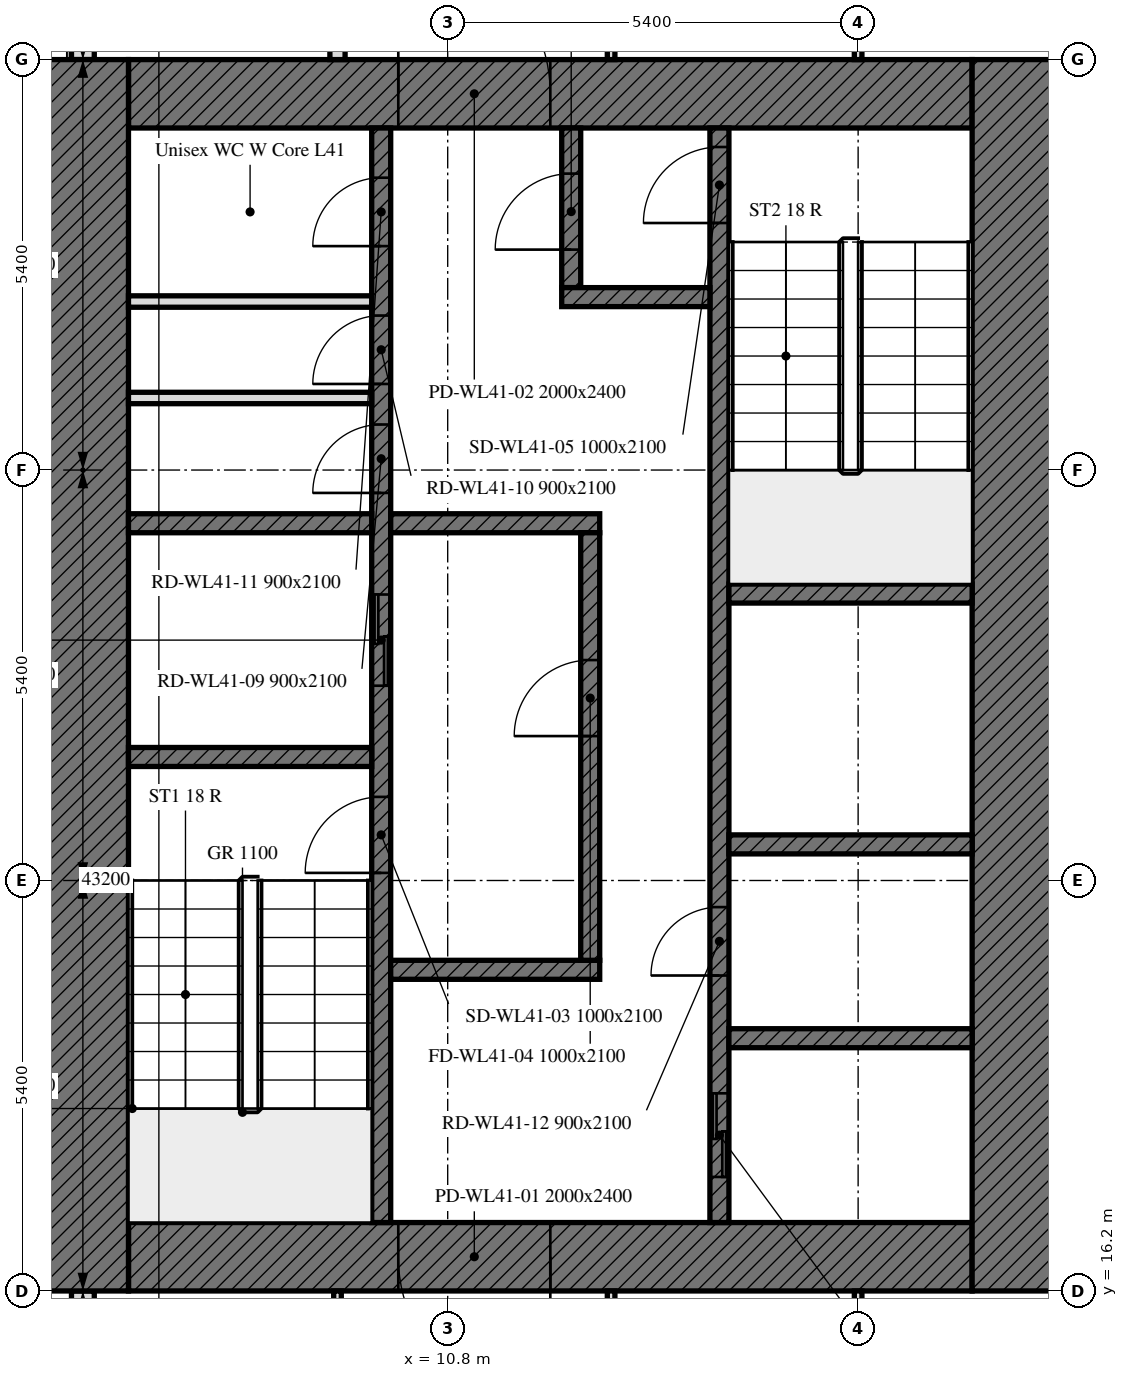
"""IFC4 building model, lengths in metres.
Left out: names, types, materials, properties, quantities, classifications, styles, units other than length and angle.
Written with IfcOpenShell. Run it as: python <this file> out.ifc"""

import sys

from ifc_helpers import new_model, si_unit, direction, frame, frame_2d, origin, place, context, subcontext, project, spatial, rectangle, extrude, element, fill, save


model = new_model("IFC4")
c1 = context("Model", 3, precision=1e-05, world=origin(), true_north=direction((0.0, 1.0)))
c2 = subcontext(c1, "Body", "Model", "MODEL_VIEW")
j1 = project(units=[si_unit("LENGTHUNIT", "METRE"), si_unit("PLANEANGLEUNIT", "RADIAN")], contexts=[c1])
p1 = place(None, origin())
s1 = spatial("IfcSite", under=j1, at=p1, CompositionType="ELEMENT")
p2 = place(p1, origin())
s2 = spatial("IfcBuilding", under=s1, at=p2, CompositionType="ELEMENT")
p3 = place(p2, frame((0.0, 0.0, 172.6)))
s3 = spatial("IfcBuildingStorey", under=s2, at=p3, CompositionType="ELEMENT", Elevation=172.6)
p4 = place(p3, frame((6.0, 37.614, 0.0), z_axis=(0.0, 0.0, 1.0), x_axis=(0.0, -1.0, 0.0)))
e1 = element("IfcWall", 1, at=p4, inside=s3, PredefinedType="SOLIDWALL", context=c2, shape_type="SweptSolid", body=[
    extrude(rectangle(XDim=5.214, YDim=0.3, at=frame_2d((2.607, 0.0))), origin(), (0.0, 0.0, 1.0), 2.8),
])
p5 = place(p4, frame((0.814, 0.0, 0.9)))
e2 = element("IfcOpeningElement", 2, at=p5, cuts=e1, PredefinedType="OPENING", context=c2, shape_type="SweptSolid", body=[
    extrude(rectangle(XDim=1.1, YDim=1.7, at=frame_2d((0.55, 0.85))), frame((0.0, 0.16, 0.0), z_axis=(0.0, -1.0, 0.0), x_axis=(1.0, 0.0, 0.0)), (0.0, 0.0, 1.0), 0.32),
])
p6 = place(p4, frame((2.764, 0.0, 0.9)))
e3 = element("IfcOpeningElement", 3, at=p6, cuts=e1, PredefinedType="OPENING", context=c2, shape_type="SweptSolid", body=[
    extrude(rectangle(XDim=1.1, YDim=1.7, at=frame_2d((0.55, 0.85))), frame((0.0, 0.16, 0.0), z_axis=(0.0, -1.0, 0.0), x_axis=(1.0, 0.0, 0.0)), (0.0, 0.0, 1.0), 0.32),
])
p7 = place(p3, frame((6.0, 16.2, 0.0), z_axis=(0.0, 0.0, 1.0), x_axis=(0.0, -1.0, 0.0)))
e4 = element("IfcWall", 4, at=p7, inside=s3, PredefinedType="SOLIDWALL", context=c2, shape_type="SweptSolid", body=[
    extrude(rectangle(XDim=10.614, YDim=0.3, at=frame_2d((5.307, 0.0))), origin(), (0.0, 0.0, 1.0), 2.8),
])
p8 = place(p7, frame((1.0, 0.0, 0.9)))
e5 = element("IfcOpeningElement", 5, at=p8, cuts=e4, PredefinedType="OPENING", context=c2, shape_type="SweptSolid", body=[
    extrude(rectangle(XDim=3.4, YDim=1.7, at=frame_2d((1.7, 0.85))), frame((0.0, 0.16, 0.0), z_axis=(0.0, -1.0, 0.0), x_axis=(1.0, 0.0, 0.0)), (0.0, 0.0, 1.0), 0.32),
])
p9 = place(p7, frame((6.75, 0.0, 0.9)))
e6 = element("IfcOpeningElement", 6, at=p9, cuts=e4, PredefinedType="OPENING", context=c2, shape_type="SweptSolid", body=[
    extrude(rectangle(XDim=1.1, YDim=1.7, at=frame_2d((0.55, 0.85))), frame((0.0, 0.16, 0.0), z_axis=(0.0, -1.0, 0.0), x_axis=(1.0, 0.0, 0.0)), (0.0, 0.0, 1.0), 0.32),
])
p10 = place(p7, frame((8.35, 0.0, 0.9)))
e7 = element("IfcOpeningElement", 7, at=p10, cuts=e4, PredefinedType="OPENING", context=c2, shape_type="SweptSolid", body=[
    extrude(rectangle(XDim=1.1, YDim=1.7, at=frame_2d((0.55, 0.85))), frame((0.0, 0.16, 0.0), z_axis=(0.0, -1.0, 0.0), x_axis=(1.0, 0.0, 0.0)), (0.0, 0.0, 1.0), 0.32),
])
p11 = place(p3, frame((17.7, 16.65, 0.0), z_axis=(0.0, 0.0, 1.0), x_axis=(-1.0, 0.0, 0.0)))
e8 = element("IfcWall", 8, at=p11, inside=s3, PredefinedType="SOLIDWALL", context=c2, shape_type="SweptSolid", body=[
    extrude(rectangle(XDim=11.1, YDim=0.9, at=frame_2d((5.55, 0.0))), origin(), (0.0, 0.0, 1.0), 2.8),
])
p12 = place(p11, frame((5.55, 0.0, 0.0)))
e9 = element("IfcOpeningElement", 9, at=p12, cuts=e8, PredefinedType="OPENING", context=c2, shape_type="SweptSolid", body=[
    extrude(rectangle(XDim=2.0, YDim=2.4, at=frame_2d((1.0, 1.2))), frame((0.0, 0.45, 0.0), z_axis=(0.0, -1.0, 0.0), x_axis=(1.0, 0.0, 0.0)), (0.0, 0.0, 1.0), 0.9),
])
p13 = place(p3, frame((6.6, 31.95, 0.0), z_axis=(0.0, 0.0, 1.0), x_axis=(1.0, 0.0, 0.0)))
e10 = element("IfcWall", 10, at=p13, inside=s3, PredefinedType="SOLIDWALL", context=c2, shape_type="SweptSolid", body=[
    extrude(rectangle(XDim=11.1, YDim=0.9, at=frame_2d((5.55, 0.0))), origin(), (0.0, 0.0, 1.0), 2.8),
])
p14 = place(p13, frame((3.55, 0.0, 0.0)))
e11 = element("IfcOpeningElement", 11, at=p14, cuts=e10, PredefinedType="OPENING", context=c2, shape_type="SweptSolid", body=[
    extrude(rectangle(XDim=2.0, YDim=2.4, at=frame_2d((1.0, 1.2))), frame((0.0, 0.45, 0.0), z_axis=(0.0, -1.0, 0.0), x_axis=(1.0, 0.0, 0.0)), (0.0, 0.0, 1.0), 0.9),
])
for number, where, z_axis, x_axis in (
    (12, (6.0, 16.2, 0.0), (0.0, 0.0, 1.0), (0.0, 1.0, 0.0)),
    (13, (18.3, 32.4, 0.0), (0.0, 0.0, 1.0), (0.0, -1.0, 0.0)),
):
    element("IfcWall", number, at=place(p3, frame(where, z_axis=z_axis, x_axis=x_axis)), inside=s3, PredefinedType="SOLIDWALL", context=c2, shape_type="SweptSolid", body=[
        extrude(rectangle(XDim=16.2, YDim=1.2, at=frame_2d((8.1, 0.0))), origin(), (0.0, 0.0, 1.0), 2.8),
    ])
p15 = place(p3, frame((9.925, 17.1, 0.0), z_axis=(0.0, 0.0, 1.0), x_axis=(0.0, 1.0, 0.0)))
e14 = element("IfcWall", 14, at=p15, inside=s3, PredefinedType="SOLIDWALL", context=c2, shape_type="SweptSolid", body=[
    extrude(rectangle(XDim=14.4, YDim=0.25, at=frame_2d((7.2, 0.0))), origin(), (0.0, 0.0, 1.0), 2.8),
])
p16 = place(p15, frame((4.6, 0.0, 0.0)))
e15 = element("IfcOpeningElement", 15, at=p16, cuts=e14, PredefinedType="OPENING", context=c2, shape_type="SweptSolid", body=[
    extrude(rectangle(XDim=1.0, YDim=2.1, at=frame_2d((0.5, 1.05))), frame((0.0, 0.125, 0.0), z_axis=(0.0, -1.0, 0.0), x_axis=(1.0, 0.0, 0.0)), (0.0, 0.0, 1.0), 0.25),
])
p17 = place(p15, frame((7.062, 0.0, 0.0)))
e16 = element("IfcOpeningElement", 16, at=p17, cuts=e14, PredefinedType="OPENING", context=c2, shape_type="SweptSolid", body=[
    extrude(rectangle(XDim=1.2, YDim=2.1, at=frame_2d((0.6, 1.05))), frame((0.0, 0.125, 0.0), z_axis=(0.0, -1.0, 0.0), x_axis=(1.0, 0.0, 0.0)), (0.0, 0.0, 1.0), 0.25),
])
p18 = place(p15, frame((9.599, 0.0, 0.0)))
e17 = element("IfcOpeningElement", 17, at=p18, cuts=e14, PredefinedType="OPENING", context=c2, shape_type="SweptSolid", body=[
    extrude(rectangle(XDim=0.9, YDim=2.1, at=frame_2d((0.45, 1.05))), frame((0.0, 0.125, 0.0), z_axis=(0.0, -1.0, 0.0), x_axis=(1.0, 0.0, 0.0)), (0.0, 0.0, 1.0), 0.25),
])
p19 = place(p15, frame((11.032, 0.0, 0.0)))
e18 = element("IfcOpeningElement", 18, at=p19, cuts=e14, PredefinedType="OPENING", context=c2, shape_type="SweptSolid", body=[
    extrude(rectangle(XDim=0.9, YDim=2.1, at=frame_2d((0.45, 1.05))), frame((0.0, 0.125, 0.0), z_axis=(0.0, -1.0, 0.0), x_axis=(1.0, 0.0, 0.0)), (0.0, 0.0, 1.0), 0.25),
])
p20 = place(p15, frame((12.846, 0.0, 0.0)))
e19 = element("IfcOpeningElement", 19, at=p20, cuts=e14, PredefinedType="OPENING", context=c2, shape_type="SweptSolid", body=[
    extrude(rectangle(XDim=0.9, YDim=2.1, at=frame_2d((0.45, 1.05))), frame((0.0, 0.125, 0.0), z_axis=(0.0, -1.0, 0.0), x_axis=(1.0, 0.0, 0.0)), (0.0, 0.0, 1.0), 0.25),
])
p21 = place(p3, frame((14.375, 17.1, 0.0), z_axis=(0.0, 0.0, 1.0), x_axis=(0.0, 1.0, 0.0)))
e20 = element("IfcWall", 20, at=p21, inside=s3, PredefinedType="SOLIDWALL", context=c2, shape_type="SweptSolid", body=[
    extrude(rectangle(XDim=14.4, YDim=0.25, at=frame_2d((7.2, 0.0))), origin(), (0.0, 0.0, 1.0), 2.8),
])
p22 = place(p21, frame((13.15, 0.0, 0.0)))
e21 = element("IfcOpeningElement", 21, at=p22, cuts=e20, PredefinedType="OPENING", context=c2, shape_type="SweptSolid", body=[
    extrude(rectangle(XDim=1.0, YDim=2.1, at=frame_2d((0.5, 1.05))), frame((0.0, 0.125, 0.0), z_axis=(0.0, -1.0, 0.0), x_axis=(1.0, 0.0, 0.0)), (0.0, 0.0, 1.0), 0.25),
])
p23 = place(p21, frame((0.6, 0.0, 0.0)))
e22 = element("IfcOpeningElement", 22, at=p23, cuts=e20, PredefinedType="OPENING", context=c2, shape_type="SweptSolid", body=[
    extrude(rectangle(XDim=1.1, YDim=2.1, at=frame_2d((0.55, 1.05))), frame((0.0, 0.125, 0.0), z_axis=(0.0, -1.0, 0.0), x_axis=(1.0, 0.0, 0.0)), (0.0, 0.0, 1.0), 0.25),
])
p24 = place(p21, frame((3.25, 0.0, 0.0)))
e23 = element("IfcOpeningElement", 23, at=p24, cuts=e20, PredefinedType="OPENING", context=c2, shape_type="SweptSolid", body=[
    extrude(rectangle(XDim=0.9, YDim=2.1, at=frame_2d((0.45, 1.05))), frame((0.0, 0.125, 0.0), z_axis=(0.0, -1.0, 0.0), x_axis=(1.0, 0.0, 0.0)), (0.0, 0.0, 1.0), 0.25),
])
for number, where, z_axis, x_axis in (
    (24, (6.6, 23.225, 0.0), (0.0, 0.0, 1.0), (1.0, 0.0, 0.0)),
    (25, (14.5, 25.375, 0.0), (0.0, 0.0, 1.0), (1.0, 0.0, 0.0)),
    (26, (14.5, 22.075, 0.0), (0.0, 0.0, 1.0), (1.0, 0.0, 0.0)),
    (27, (6.6, 26.3, 0.0), (0.0, 0.0, 1.0), (1.0, 0.0, 0.0)),
):
    element("IfcWall", number, at=place(p3, frame(where, z_axis=z_axis, x_axis=x_axis)), inside=s3, PredefinedType="SOLIDWALL", context=c2, shape_type="SweptSolid", body=[
        extrude(rectangle(XDim=3.2, YDim=0.25, at=frame_2d((1.6, 0.0))), origin(), (0.0, 0.0, 1.0), 2.8),
    ])
for number, where, z_axis, x_axis in (
    (28, (10.05, 26.3, 0.0), (0.0, 0.0, 1.0), (1.0, 0.0, 0.0)),
    (29, (10.05, 20.425, 0.0), (0.0, 0.0, 1.0), (1.0, 0.0, 0.0)),
):
    element("IfcWall", number, at=place(p3, frame(where, z_axis=z_axis, x_axis=x_axis)), inside=s3, PredefinedType="SOLIDWALL", context=c2, shape_type="SweptSolid", body=[
        extrude(rectangle(XDim=2.75, YDim=0.25, at=frame_2d((1.375, 0.0))), origin(), (0.0, 0.0, 1.0), 2.8),
    ])
p25 = place(p3, frame((12.425, 29.4, 0.0), z_axis=(0.0, 0.0, 1.0), x_axis=(0.0, 1.0, 0.0)))
e30 = element("IfcWall", 30, at=p25, inside=s3, PredefinedType="SOLIDWALL", context=c2, shape_type="SweptSolid", body=[
    extrude(rectangle(XDim=2.1, YDim=0.25, at=frame_2d((1.05, 0.0))), origin(), (0.0, 0.0, 1.0), 2.8),
])
p26 = place(p25, frame((0.5, 0.0, 0.0)))
e31 = element("IfcOpeningElement", 31, at=p26, cuts=e30, PredefinedType="OPENING", context=c2, shape_type="SweptSolid", body=[
    extrude(rectangle(XDim=1.0, YDim=2.1, at=frame_2d((0.5, 1.05))), frame((0.0, 0.125, 0.0), z_axis=(0.0, -1.0, 0.0), x_axis=(1.0, 0.0, 0.0)), (0.0, 0.0, 1.0), 0.25),
])
p27 = place(p3, frame((12.3, 29.275, 0.0), z_axis=(0.0, 0.0, 1.0), x_axis=(1.0, 0.0, 0.0)))
e32 = element("IfcWall", 32, at=p27, inside=s3, PredefinedType="SOLIDWALL", context=c2, shape_type="SweptSolid", body=[
    extrude(rectangle(XDim=1.95, YDim=0.25, at=frame_2d((0.975, 0.0))), origin(), (0.0, 0.0, 1.0), 2.8),
])
p28 = place(p3, frame((12.675, 20.55, 0.0), z_axis=(0.0, 0.0, 1.0), x_axis=(0.0, 1.0, 0.0)))
e33 = element("IfcWall", 33, at=p28, inside=s3, PredefinedType="SOLIDWALL", context=c2, shape_type="SweptSolid", body=[
    extrude(rectangle(XDim=5.625, YDim=0.25, at=frame_2d((2.812, 0.0))), origin(), (0.0, 0.0, 1.0), 2.8),
])
p29 = place(p28, frame((2.95, 0.0, 0.0)))
e34 = element("IfcOpeningElement", 34, at=p29, cuts=e33, PredefinedType="OPENING", context=c2, shape_type="SweptSolid", body=[
    extrude(rectangle(XDim=1.0, YDim=2.1, at=frame_2d((0.5, 1.05))), frame((0.0, 0.125, 0.0), z_axis=(0.0, -1.0, 0.0), x_axis=(1.0, 0.0, 0.0)), (0.0, 0.0, 1.0), 0.25),
])
p30 = place(p3, frame((14.5, 19.525, 0.0), z_axis=(0.0, 0.0, 1.0), x_axis=(1.0, 0.0, 0.0)))
e35 = element("IfcWall", 35, at=p30, inside=s3, PredefinedType="SOLIDWALL", context=c2, shape_type="SweptSolid", body=[
    extrude(rectangle(XDim=3.2, YDim=0.25, at=frame_2d((1.6, 0.0))), origin(), (0.0, 0.0, 1.0), 2.8),
])
for number, where, z_axis, x_axis in (
    (36, (6.6, 27.948, 0.0), (0.0, 0.0, 1.0), (1.0, 0.0, 0.0)),
    (37, (6.6, 29.217, 0.0), (0.0, 0.0, 1.0), (1.0, 0.0, 0.0)),
):
    element("IfcWall", number, at=place(p3, frame(where, z_axis=z_axis, x_axis=x_axis)), inside=s3, PredefinedType="PARTITIONING", context=c2, shape_type="SweptSolid", body=[
        extrude(rectangle(XDim=3.2, YDim=0.15, at=frame_2d((1.6, 0.0))), origin(), (0.0, 0.0, 1.0), 2.8),
    ])
p31 = place(p3, frame((16.2, 35.475, 0.0), z_axis=(0.0, 0.0, 1.0), x_axis=(0.0, -1.0, 0.0)))
e38 = element("IfcWall", 38, at=p31, inside=s3, PredefinedType="PARTITIONING", context=c2, shape_type="SweptSolid", body=[
    extrude(rectangle(XDim=3.075, YDim=0.1, at=frame_2d((1.538, 0.0))), origin(), (0.0, 0.0, 1.0), 2.8),
])
p32 = place(p3, frame((9.35, 35.65, 0.0), z_axis=(0.0, 0.0, 1.0), x_axis=(0.0, -1.0, 0.0)))
e39 = element("IfcWall", 39, at=p32, inside=s3, PredefinedType="PARTITIONING", context=c2, shape_type="SweptSolid", body=[
    extrude(rectangle(XDim=3.25, YDim=0.2, at=frame_2d((1.625, 0.0))), origin(), (0.0, 0.0, 1.0), 2.8),
])
p33 = place(p3, frame((12.95, 32.4, 0.0), z_axis=(0.0, 0.0, 1.0), x_axis=(0.0, 1.0, 0.0)))
e40 = element("IfcWall", 40, at=p33, inside=s3, PredefinedType="PARTITIONING", context=c2, shape_type="SweptSolid", body=[
    extrude(rectangle(XDim=3.075, YDim=0.1, at=frame_2d((1.538, 0.0))), origin(), (0.0, 0.0, 1.0), 2.8),
])
p34 = place(p3, frame((16.2, 16.2, 0.0), z_axis=(0.0, 0.0, 1.0), x_axis=(0.0, -1.0, 0.0)))
e41 = element("IfcWall", 41, at=p34, inside=s3, PredefinedType="PARTITIONING", context=c2, shape_type="SweptSolid", body=[
    extrude(rectangle(XDim=4.955, YDim=0.1, at=frame_2d((2.478, 0.0))), origin(), (0.0, 0.0, 1.0), 2.2),
])
for number, where, z_axis, x_axis in (
    (42, (9.35, 16.2, 0.0), (0.0, 0.0, 1.0), (0.0, -1.0, 0.0)),
    (43, (12.95, 9.975, 0.0), (0.0, 0.0, 1.0), (0.0, 1.0, 0.0)),
):
    element("IfcWall", number, at=place(p3, frame(where, z_axis=z_axis, x_axis=x_axis)), inside=s3, PredefinedType="PARTITIONING", context=c2, shape_type="SweptSolid", body=[
        extrude(rectangle(XDim=6.225, YDim=0.1, at=frame_2d((3.112, 0.0))), origin(), (0.0, 0.0, 1.0), 2.8),
    ])
p35 = place(p12, origin())
e44 = element("IfcDoor", 44, at=p35, inside=s3, OperationType="DOUBLE_DOOR_SINGLE_SWING", PredefinedType="DOOR", context=c2, shape_type="SweptSolid", body=[
    extrude(rectangle(XDim=2.0, YDim=2.4, at=frame_2d((1.0, 1.2))), frame((0.0, 0.025, 0.0), z_axis=(0.0, -1.0, 0.0), x_axis=(1.0, 0.0, 0.0)), (0.0, 0.0, 1.0), 0.05),
])
fill(e9, e44)
p36 = place(p14, origin())
e45 = element("IfcDoor", 45, at=p36, inside=s3, OperationType="DOUBLE_DOOR_SINGLE_SWING", PredefinedType="DOOR", context=c2, shape_type="SweptSolid", body=[
    extrude(rectangle(XDim=2.0, YDim=2.4, at=frame_2d((1.0, 1.2))), frame((0.0, 0.025, 0.0), z_axis=(0.0, -1.0, 0.0), x_axis=(1.0, 0.0, 0.0)), (0.0, 0.0, 1.0), 0.05),
])
fill(e11, e45)
p37 = place(p16, origin())
e46 = element("IfcDoor", 46, at=p37, inside=s3, OperationType="SINGLE_SWING_LEFT", PredefinedType="DOOR", context=c2, shape_type="SweptSolid", body=[
    extrude(rectangle(XDim=1.0, YDim=2.1, at=frame_2d((0.5, 1.05))), frame((0.0, 0.025, 0.0), z_axis=(0.0, -1.0, 0.0), x_axis=(1.0, 0.0, 0.0)), (0.0, 0.0, 1.0), 0.05),
])
fill(e15, e46)
p38 = place(p29, origin())
e47 = element("IfcDoor", 47, at=p38, inside=s3, OperationType="SINGLE_SWING_LEFT", PredefinedType="DOOR", context=c2, shape_type="SweptSolid", body=[
    extrude(rectangle(XDim=1.0, YDim=2.1, at=frame_2d((0.5, 1.05))), frame((0.0, 0.025, 0.0), z_axis=(0.0, -1.0, 0.0), x_axis=(1.0, 0.0, 0.0)), (0.0, 0.0, 1.0), 0.05),
])
fill(e34, e47)
p39 = place(p22, origin())
e48 = element("IfcDoor", 48, at=p39, inside=s3, OperationType="SINGLE_SWING_LEFT", PredefinedType="DOOR", context=c2, shape_type="SweptSolid", body=[
    extrude(rectangle(XDim=1.0, YDim=2.1, at=frame_2d((0.5, 1.05))), frame((0.0, 0.025, 0.0), z_axis=(0.0, -1.0, 0.0), x_axis=(1.0, 0.0, 0.0)), (0.0, 0.0, 1.0), 0.05),
])
fill(e21, e48)
p40 = place(p26, origin())
e49 = element("IfcDoor", 49, at=p40, inside=s3, OperationType="SINGLE_SWING_LEFT", PredefinedType="DOOR", context=c2, shape_type="SweptSolid", body=[
    extrude(rectangle(XDim=1.0, YDim=2.1, at=frame_2d((0.5, 1.05))), frame((0.0, 0.025, 0.0), z_axis=(0.0, -1.0, 0.0), x_axis=(1.0, 0.0, 0.0)), (0.0, 0.0, 1.0), 0.05),
])
fill(e31, e49)
p41 = place(p17, origin())
e50 = element("IfcDoor", 50, at=p41, inside=s3, OperationType="DOUBLE_DOOR_SLIDING", PredefinedType="DOOR", context=c2, shape_type="SweptSolid", body=[
    extrude(rectangle(XDim=1.2, YDim=2.1, at=frame_2d((0.6, 1.05))), frame((0.0, 0.025, 0.0), z_axis=(0.0, -1.0, 0.0), x_axis=(1.0, 0.0, 0.0)), (0.0, 0.0, 1.0), 0.05),
])
fill(e16, e50)
p42 = place(p23, origin())
e51 = element("IfcDoor", 51, at=p42, inside=s3, OperationType="DOUBLE_DOOR_SLIDING", PredefinedType="DOOR", context=c2, shape_type="SweptSolid", body=[
    extrude(rectangle(XDim=1.1, YDim=2.1, at=frame_2d((0.55, 1.05))), frame((0.0, 0.025, 0.0), z_axis=(0.0, -1.0, 0.0), x_axis=(1.0, 0.0, 0.0)), (0.0, 0.0, 1.0), 0.05),
])
fill(e22, e51)
p43 = place(p18, origin())
e52 = element("IfcDoor", 52, at=p43, inside=s3, OperationType="SINGLE_SWING_LEFT", PredefinedType="DOOR", context=c2, shape_type="SweptSolid", body=[
    extrude(rectangle(XDim=0.9, YDim=2.1, at=frame_2d((0.45, 1.05))), frame((0.0, 0.025, 0.0), z_axis=(0.0, -1.0, 0.0), x_axis=(1.0, 0.0, 0.0)), (0.0, 0.0, 1.0), 0.05),
])
fill(e17, e52)
p44 = place(p19, origin())
e53 = element("IfcDoor", 53, at=p44, inside=s3, OperationType="SINGLE_SWING_LEFT", PredefinedType="DOOR", context=c2, shape_type="SweptSolid", body=[
    extrude(rectangle(XDim=0.9, YDim=2.1, at=frame_2d((0.45, 1.05))), frame((0.0, 0.025, 0.0), z_axis=(0.0, -1.0, 0.0), x_axis=(1.0, 0.0, 0.0)), (0.0, 0.0, 1.0), 0.05),
])
fill(e18, e53)
p45 = place(p20, origin())
e54 = element("IfcDoor", 54, at=p45, inside=s3, OperationType="SINGLE_SWING_LEFT", PredefinedType="DOOR", context=c2, shape_type="SweptSolid", body=[
    extrude(rectangle(XDim=0.9, YDim=2.1, at=frame_2d((0.45, 1.05))), frame((0.0, 0.025, 0.0), z_axis=(0.0, -1.0, 0.0), x_axis=(1.0, 0.0, 0.0)), (0.0, 0.0, 1.0), 0.05),
])
fill(e19, e54)
p46 = place(p24, origin())
e55 = element("IfcDoor", 55, at=p46, inside=s3, OperationType="SINGLE_SWING_LEFT", PredefinedType="DOOR", context=c2, shape_type="SweptSolid", body=[
    extrude(rectangle(XDim=0.9, YDim=2.1, at=frame_2d((0.45, 1.05))), frame((0.0, 0.025, 0.0), z_axis=(0.0, -1.0, 0.0), x_axis=(1.0, 0.0, 0.0)), (0.0, 0.0, 1.0), 0.05),
])
fill(e23, e55)
save(model, sys.argv[1])
